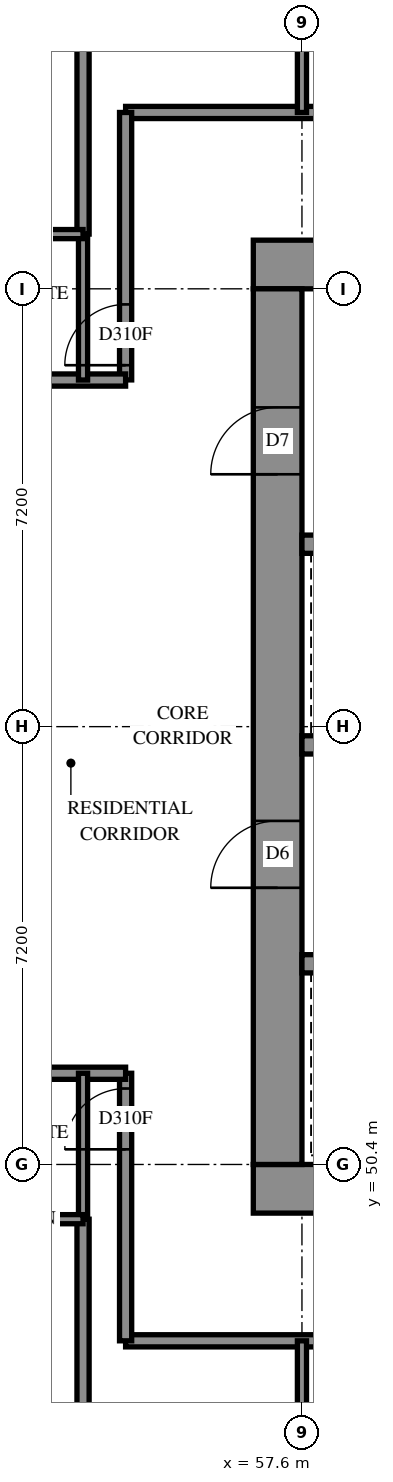
"""IFC4 building model, lengths in metres.
Left out: names, types, materials, properties, quantities, classifications, styles, units other than length and angle.
Written with IfcOpenShell. Run it as: python <this file> out.ifc"""

import sys

from ifc_helpers import new_model, si_unit, direction, frame, frame_2d, origin, place, context, subcontext, project, spatial, rectangle, extrude, element, fill, save


model = new_model("IFC4")
c1 = context("Model", 3, precision=1e-05, world=origin(), true_north=direction((0.0, 1.0)))
c2 = subcontext(c1, "Body", "Model", "MODEL_VIEW")
j1 = project(units=[si_unit("LENGTHUNIT", "METRE"), si_unit("PLANEANGLEUNIT", "RADIAN")], contexts=[c1])
p1 = place(None, origin())
s1 = spatial("IfcSite", under=j1, at=p1, CompositionType="ELEMENT")
p2 = place(p1, origin())
s2 = spatial("IfcBuilding", under=s1, at=p2, CompositionType="ELEMENT")
p3 = place(p2, frame((0.0, 0.0, 94.8)))
s3 = spatial("IfcBuildingStorey", under=s2, at=p3, CompositionType="ELEMENT", Elevation=94.8)
p4 = place(p3, frame((56.8, 50.0, -0.3), z_axis=(0.0, 0.0, 1.0), x_axis=(1.0, 0.0, 0.0)))
e1 = element("IfcWall", 1, at=p4, inside=s3, PredefinedType="SHEAR", context=c2, shape_type="SweptSolid", body=[
    extrude(rectangle(XDim=16.0, YDim=0.8, at=frame_2d((8.0, 0.0))), origin(), (0.0, 0.0, 1.0), 2.7),
])
p5 = place(p3, frame((56.8, 65.2, -0.3), z_axis=(0.0, 0.0, 1.0), x_axis=(1.0, 0.0, 0.0)))
e2 = element("IfcWall", 2, at=p5, inside=s3, PredefinedType="SHEAR", context=c2, shape_type="SweptSolid", body=[
    extrude(rectangle(XDim=16.0, YDim=0.8, at=frame_2d((8.0, 0.0))), origin(), (0.0, 0.0, 1.0), 2.7),
])
p6 = place(p5, frame((10.8, 0.0, 0.3)))
e3 = element("IfcOpeningElement", 3, at=p6, cuts=e2, PredefinedType="OPENING", context=c2, shape_type="SweptSolid", body=[
    extrude(rectangle(XDim=0.8, YDim=2.1, at=frame_2d((0.4, 1.05))), frame((0.0, 0.41, 0.0), z_axis=(0.0, -1.0, 0.0), x_axis=(1.0, 0.0, 0.0)), (0.0, 0.0, 1.0), 0.82),
])
p7 = place(p3, frame((57.2, 50.4, -0.3), z_axis=(0.0, 0.0, 1.0), x_axis=(0.0, 1.0, 0.0)))
e4 = element("IfcWall", 4, at=p7, inside=s3, PredefinedType="SHEAR", context=c2, shape_type="SweptSolid", body=[
    extrude(rectangle(XDim=14.4, YDim=0.8, at=frame_2d((7.2, 0.0))), origin(), (0.0, 0.0, 1.0), 2.7),
])
p8 = place(p7, frame((4.55, 0.0, 0.3)))
e5 = element("IfcOpeningElement", 5, at=p8, cuts=e4, PredefinedType="OPENING", context=c2, shape_type="SweptSolid", body=[
    extrude(rectangle(XDim=1.1, YDim=2.1, at=frame_2d((0.55, 1.05))), frame((0.0, 0.41, 0.0), z_axis=(0.0, -1.0, 0.0), x_axis=(1.0, 0.0, 0.0)), (0.0, 0.0, 1.0), 0.82),
])
p9 = place(p7, frame((11.35, 0.0, 0.3)))
e6 = element("IfcOpeningElement", 6, at=p9, cuts=e4, PredefinedType="OPENING", context=c2, shape_type="SweptSolid", body=[
    extrude(rectangle(XDim=1.1, YDim=2.1, at=frame_2d((0.55, 1.05))), frame((0.0, 0.41, 0.0), z_axis=(0.0, -1.0, 0.0), x_axis=(1.0, 0.0, 0.0)), (0.0, 0.0, 1.0), 0.82),
])
p10 = place(p3, frame((57.6, 53.7, 0.0), z_axis=(0.0, 0.0, 1.0), x_axis=(1.0, 0.0, 0.0)))
e7 = element("IfcWall", 7, at=p10, inside=s3, PredefinedType="SOLIDWALL", context=c2, shape_type="SweptSolid", body=[
    extrude(rectangle(XDim=14.4, YDim=0.3, at=frame_2d((7.2, 0.0))), origin(), (0.0, 0.0, 1.0), 3.1),
])
p11 = place(p10, frame((1.25, 0.0, 0.0)))
e8 = element("IfcOpeningElement", 8, at=p11, cuts=e7, PredefinedType="OPENING", context=c2, shape_type="SweptSolid", body=[
    extrude(rectangle(XDim=1.1, YDim=2.1, at=frame_2d((0.55, 1.05))), frame((0.0, 0.16, 0.0), z_axis=(0.0, -1.0, 0.0), x_axis=(1.0, 0.0, 0.0)), (0.0, 0.0, 1.0), 0.32),
])
p12 = place(p10, frame((4.85, 0.0, 0.0)))
e9 = element("IfcOpeningElement", 9, at=p12, cuts=e7, PredefinedType="OPENING", context=c2, shape_type="SweptSolid", body=[
    extrude(rectangle(XDim=1.1, YDim=2.1, at=frame_2d((0.55, 1.05))), frame((0.0, 0.16, 0.0), z_axis=(0.0, -1.0, 0.0), x_axis=(1.0, 0.0, 0.0)), (0.0, 0.0, 1.0), 0.32),
])
p13 = place(p10, frame((8.45, 0.0, 0.0)))
e10 = element("IfcOpeningElement", 10, at=p13, cuts=e7, PredefinedType="OPENING", context=c2, shape_type="SweptSolid", body=[
    extrude(rectangle(XDim=1.1, YDim=2.1, at=frame_2d((0.55, 1.05))), frame((0.0, 0.16, 0.0), z_axis=(0.0, -1.0, 0.0), x_axis=(1.0, 0.0, 0.0)), (0.0, 0.0, 1.0), 0.32),
])
p14 = place(p10, frame((12.05, 0.0, 0.0)))
e11 = element("IfcOpeningElement", 11, at=p14, cuts=e7, PredefinedType="OPENING", context=c2, shape_type="SweptSolid", body=[
    extrude(rectangle(XDim=1.1, YDim=2.1, at=frame_2d((0.55, 1.05))), frame((0.0, 0.16, 0.0), z_axis=(0.0, -1.0, 0.0), x_axis=(1.0, 0.0, 0.0)), (0.0, 0.0, 1.0), 0.32),
])
p15 = place(p3, frame((57.6, 57.3, 0.0), z_axis=(0.0, 0.0, 1.0), x_axis=(1.0, 0.0, 0.0)))
e12 = element("IfcWall", 12, at=p15, inside=s3, PredefinedType="SOLIDWALL", context=c2, shape_type="SweptSolid", body=[
    extrude(rectangle(XDim=14.4, YDim=0.3, at=frame_2d((7.2, 0.0))), origin(), (0.0, 0.0, 1.0), 3.1),
])
p16 = place(p15, frame((12.05, 0.0, 0.0)))
e13 = element("IfcOpeningElement", 13, at=p16, cuts=e12, PredefinedType="OPENING", context=c2, shape_type="SweptSolid", body=[
    extrude(rectangle(XDim=1.1, YDim=2.1, at=frame_2d((0.55, 1.05))), frame((0.0, 0.16, 0.0), z_axis=(0.0, -1.0, 0.0), x_axis=(1.0, 0.0, 0.0)), (0.0, 0.0, 1.0), 0.32),
])
p17 = place(p3, frame((57.6, 60.6, 0.0), z_axis=(0.0, 0.0, 1.0), x_axis=(1.0, 0.0, 0.0)))
e14 = element("IfcWall", 14, at=p17, inside=s3, PredefinedType="SOLIDWALL", context=c2, shape_type="SweptSolid", body=[
    extrude(rectangle(XDim=7.2, YDim=0.3, at=frame_2d((3.6, 0.0))), origin(), (0.0, 0.0, 1.0), 3.1),
])
p18 = place(p3, frame((54.7, 67.7, 0.0), z_axis=(0.0, 0.0, 1.0), x_axis=(1.0, 0.0, 0.0)))
e15 = element("IfcWall", 15, at=p18, inside=s3, PredefinedType="PARTITIONING", context=c2, shape_type="SweptSolid", body=[
    extrude(rectangle(XDim=20.2, YDim=0.2, at=frame_2d((10.1, 0.0))), origin(), (0.0, 0.0, 1.0), 3.1),
])
p19 = place(p18, frame((5.25, 0.0, 0.0)))
e16 = element("IfcOpeningElement", 16, at=p19, cuts=e15, PredefinedType="OPENING", context=c2, shape_type="SweptSolid", body=[
    extrude(rectangle(XDim=0.9, YDim=2.1, at=frame_2d((0.45, 1.05))), frame((0.0, 0.11, 0.0), z_axis=(0.0, -1.0, 0.0), x_axis=(1.0, 0.0, 0.0)), (0.0, 0.0, 1.0), 0.22),
])
p20 = place(p18, frame((6.9, 0.0, 0.0)))
e17 = element("IfcOpeningElement", 17, at=p20, cuts=e15, PredefinedType="OPENING", context=c2, shape_type="SweptSolid", body=[
    extrude(rectangle(XDim=0.9, YDim=2.1, at=frame_2d((0.45, 1.05))), frame((0.0, 0.11, 0.0), z_axis=(0.0, -1.0, 0.0), x_axis=(1.0, 0.0, 0.0)), (0.0, 0.0, 1.0), 0.22),
])
p21 = place(p18, frame((12.45, 0.0, 0.0)))
e18 = element("IfcOpeningElement", 18, at=p21, cuts=e15, PredefinedType="OPENING", context=c2, shape_type="SweptSolid", body=[
    extrude(rectangle(XDim=0.9, YDim=2.1, at=frame_2d((0.45, 1.05))), frame((0.0, 0.11, 0.0), z_axis=(0.0, -1.0, 0.0), x_axis=(1.0, 0.0, 0.0)), (0.0, 0.0, 1.0), 0.22),
])
p22 = place(p18, frame((14.1, 0.0, 0.0)))
e19 = element("IfcOpeningElement", 19, at=p22, cuts=e15, PredefinedType="OPENING", context=c2, shape_type="SweptSolid", body=[
    extrude(rectangle(XDim=0.9, YDim=2.1, at=frame_2d((0.45, 1.05))), frame((0.0, 0.11, 0.0), z_axis=(0.0, -1.0, 0.0), x_axis=(1.0, 0.0, 0.0)), (0.0, 0.0, 1.0), 0.22),
])
p23 = place(p3, frame((54.7, 47.5, 0.0), z_axis=(0.0, 0.0, 1.0), x_axis=(1.0, 0.0, 0.0)))
e20 = element("IfcWall", 20, at=p23, inside=s3, PredefinedType="PARTITIONING", context=c2, shape_type="SweptSolid", body=[
    extrude(rectangle(XDim=19.442, YDim=0.2, at=frame_2d((9.721, 0.0))), origin(), (0.0, 0.0, 1.0), 3.1),
])
p24 = place(p23, frame((5.2, 0.0, 0.0)))
e21 = element("IfcOpeningElement", 21, at=p24, cuts=e20, PredefinedType="OPENING", context=c2, shape_type="SweptSolid", body=[
    extrude(rectangle(XDim=0.9, YDim=2.1, at=frame_2d((0.45, 1.05))), frame((0.0, 0.11, 0.0), z_axis=(0.0, -1.0, 0.0), x_axis=(1.0, 0.0, 0.0)), (0.0, 0.0, 1.0), 0.22),
])
p25 = place(p23, frame((6.9, 0.0, 0.0)))
e22 = element("IfcOpeningElement", 22, at=p25, cuts=e20, PredefinedType="OPENING", context=c2, shape_type="SweptSolid", body=[
    extrude(rectangle(XDim=0.9, YDim=2.1, at=frame_2d((0.45, 1.05))), frame((0.0, 0.11, 0.0), z_axis=(0.0, -1.0, 0.0), x_axis=(1.0, 0.0, 0.0)), (0.0, 0.0, 1.0), 0.22),
])
p26 = place(p23, frame((13.963, 0.0, 0.0)))
e23 = element("IfcOpeningElement", 23, at=p26, cuts=e20, PredefinedType="OPENING", context=c2, shape_type="SweptSolid", body=[
    extrude(rectangle(XDim=1.0, YDim=2.1, at=frame_2d((0.5, 1.05))), frame((0.0, 0.11, 0.0), z_axis=(0.0, -1.0, 0.0), x_axis=(1.0, 0.0, 0.0)), (0.0, 0.0, 1.0), 0.22),
])
p27 = place(p3, frame((54.0, 42.384, 0.0), z_axis=(0.0, 0.0, 1.0), x_axis=(0.0, 1.0, 0.0)))
e24 = element("IfcWall", 24, at=p27, inside=s3, PredefinedType="PARTITIONING", context=c2, shape_type="SweptSolid", body=[
    extrude(rectangle(XDim=7.116, YDim=0.2, at=frame_2d((3.558, 0.0))), origin(), (0.0, 0.0, 1.0), 3.1),
])
p28 = place(p3, frame((54.0, 65.7, 0.0), z_axis=(0.0, 0.0, 1.0), x_axis=(0.0, 1.0, 0.0)))
e25 = element("IfcWall", 25, at=p28, inside=s3, PredefinedType="PARTITIONING", context=c2, shape_type="SweptSolid", body=[
    extrude(rectangle(XDim=6.997, YDim=0.2, at=frame_2d((3.498, 0.0))), origin(), (0.0, 0.0, 1.0), 3.1),
])
p29 = place(p3, frame((54.7, 47.5, 0.0), z_axis=(0.0, 0.0, 1.0), x_axis=(0.0, 1.0, 0.0)))
e26 = element("IfcWall", 26, at=p29, inside=s3, PredefinedType="PARTITIONING", context=c2, shape_type="SweptSolid", body=[
    extrude(rectangle(XDim=4.4, YDim=0.2, at=frame_2d((2.2, 0.0))), origin(), (0.0, 0.0, 1.0), 3.1),
])
p30 = place(p29, frame((3.149, 0.0, 0.0)))
e27 = element("IfcOpeningElement", 27, at=p30, cuts=e26, PredefinedType="OPENING", context=c2, shape_type="SweptSolid", body=[
    extrude(rectangle(XDim=1.0, YDim=2.1, at=frame_2d((0.5, 1.05))), frame((0.0, 0.11, 0.0), z_axis=(0.0, -1.0, 0.0), x_axis=(1.0, 0.0, 0.0)), (0.0, 0.0, 1.0), 0.22),
])
p31 = place(p3, frame((54.7, 63.302, 0.0), z_axis=(0.0, 0.0, 1.0), x_axis=(0.0, 1.0, 0.0)))
e28 = element("IfcWall", 28, at=p31, inside=s3, PredefinedType="PARTITIONING", context=c2, shape_type="SweptSolid", body=[
    extrude(rectangle(XDim=4.398, YDim=0.2, at=frame_2d((2.199, 0.0))), origin(), (0.0, 0.0, 1.0), 3.1),
])
p32 = place(p31, frame((0.242, 0.0, 0.0)))
e29 = element("IfcOpeningElement", 29, at=p32, cuts=e28, PredefinedType="OPENING", context=c2, shape_type="SweptSolid", body=[
    extrude(rectangle(XDim=1.0, YDim=2.1, at=frame_2d((0.5, 1.05))), frame((0.0, 0.11, 0.0), z_axis=(0.0, -1.0, 0.0), x_axis=(1.0, 0.0, 0.0)), (0.0, 0.0, 1.0), 0.22),
])
p33 = place(p3, frame((50.4, 51.9, 0.0), z_axis=(0.0, 0.0, 1.0), x_axis=(1.0, 0.0, 0.0)))
e30 = element("IfcWall", 30, at=p33, inside=s3, PredefinedType="PARTITIONING", context=c2, shape_type="SweptSolid", body=[
    extrude(rectangle(XDim=4.3, YDim=0.2, at=frame_2d((2.15, 0.0))), origin(), (0.0, 0.0, 1.0), 3.1),
])
p34 = place(p33, frame((0.552, 0.0, 0.0)))
e31 = element("IfcOpeningElement", 31, at=p34, cuts=e30, PredefinedType="OPENING", context=c2, shape_type="SweptSolid", body=[
    extrude(rectangle(XDim=0.9, YDim=2.1, at=frame_2d((0.45, 1.05))), frame((0.0, 0.11, 0.0), z_axis=(0.0, -1.0, 0.0), x_axis=(1.0, 0.0, 0.0)), (0.0, 0.0, 1.0), 0.22),
])
p35 = place(p3, frame((50.4, 63.3, 0.0), z_axis=(0.0, 0.0, 1.0), x_axis=(1.0, 0.0, 0.0)))
e32 = element("IfcWall", 32, at=p35, inside=s3, PredefinedType="PARTITIONING", context=c2, shape_type="SweptSolid", body=[
    extrude(rectangle(XDim=4.3, YDim=0.2, at=frame_2d((2.15, 0.0))), origin(), (0.0, 0.0, 1.0), 3.1),
])
p36 = place(p35, frame((0.552, 0.0, 0.0)))
e33 = element("IfcOpeningElement", 33, at=p36, cuts=e32, PredefinedType="OPENING", context=c2, shape_type="SweptSolid", body=[
    extrude(rectangle(XDim=0.9, YDim=2.1, at=frame_2d((0.45, 1.05))), frame((0.0, 0.11, 0.0), z_axis=(0.0, -1.0, 0.0), x_axis=(1.0, 0.0, 0.0)), (0.0, 0.0, 1.0), 0.22),
])
for number, where, z_axis, x_axis in (
    (34, (54.0, 63.3, 0.0), (0.0, 0.0, 1.0), (0.0, 1.0, 0.0)),
    (35, (54.0, 49.5, 0.0), (0.0, 0.0, 1.0), (0.0, 1.0, 0.0)),
    (36, (57.6, 45.1, 0.0), (0.0, 0.0, 1.0), (0.0, 1.0, 0.0)),
    (37, (57.6, 67.7, 0.0), (0.0, 0.0, 1.0), (0.0, 1.0, 0.0)),
):
    element("IfcWall", number, at=place(p3, frame(where, z_axis=z_axis, x_axis=x_axis)), inside=s3, PredefinedType="PARTITIONING", context=c2, shape_type="SweptSolid", body=[
        extrude(rectangle(XDim=2.4, YDim=0.15, at=frame_2d((1.2, 0.0))), origin(), (0.0, 0.0, 1.0), 3.1),
    ])
p37 = place(p3, frame((52.1, 49.5, 0.0), z_axis=(0.0, 0.0, 1.0), x_axis=(1.0, 0.0, 0.0)))
e38 = element("IfcWall", 38, at=p37, inside=s3, PredefinedType="PARTITIONING", context=c2, shape_type="SweptSolid", body=[
    extrude(rectangle(XDim=1.9, YDim=0.15, at=frame_2d((0.95, 0.0))), origin(), (0.0, 0.0, 1.0), 3.1),
])
p38 = place(p37, frame((0.598, 0.0, 0.0)))
e39 = element("IfcOpeningElement", 39, at=p38, cuts=e38, PredefinedType="OPENING", context=c2, shape_type="SweptSolid", body=[
    extrude(rectangle(XDim=0.8, YDim=2.1, at=frame_2d((0.4, 1.05))), frame((0.0, 0.085, 0.0), z_axis=(0.0, -1.0, 0.0), x_axis=(1.0, 0.0, 0.0)), (0.0, 0.0, 1.0), 0.17),
])
p39 = place(p3, frame((52.1, 65.7, 0.0), z_axis=(0.0, 0.0, 1.0), x_axis=(1.0, 0.0, 0.0)))
e40 = element("IfcWall", 40, at=p39, inside=s3, PredefinedType="PARTITIONING", context=c2, shape_type="SweptSolid", body=[
    extrude(rectangle(XDim=1.9, YDim=0.15, at=frame_2d((0.95, 0.0))), origin(), (0.0, 0.0, 1.0), 3.1),
])
p40 = place(p39, frame((0.493, 0.0, 0.0)))
e41 = element("IfcOpeningElement", 41, at=p40, cuts=e40, PredefinedType="OPENING", context=c2, shape_type="SweptSolid", body=[
    extrude(rectangle(XDim=0.8, YDim=2.1, at=frame_2d((0.4, 1.05))), frame((0.0, 0.085, 0.0), z_axis=(0.0, -1.0, 0.0), x_axis=(1.0, 0.0, 0.0)), (0.0, 0.0, 1.0), 0.17),
])
p41 = place(p8, origin())
e42 = element("IfcDoor", 42, at=p41, inside=s3, OperationType="DOUBLE_DOOR_SINGLE_SWING", PredefinedType="DOOR", context=c2, shape_type="SweptSolid", body=[
    extrude(rectangle(XDim=1.1, YDim=2.1, at=frame_2d((0.55, 1.05))), frame((0.0, 0.025, 0.0), z_axis=(0.0, -1.0, 0.0), x_axis=(1.0, 0.0, 0.0)), (0.0, 0.0, 1.0), 0.05),
])
fill(e5, e42)
p42 = place(p9, origin())
e43 = element("IfcDoor", 43, at=p42, inside=s3, OperationType="SINGLE_SWING_LEFT", PredefinedType="DOOR", context=c2, shape_type="SweptSolid", body=[
    extrude(rectangle(XDim=1.1, YDim=2.1, at=frame_2d((0.55, 1.05))), frame((0.0, 0.025, 0.0), z_axis=(0.0, -1.0, 0.0), x_axis=(1.0, 0.0, 0.0)), (0.0, 0.0, 1.0), 0.05),
])
fill(e6, e43)
p43 = place(p32, origin())
e44 = element("IfcDoor", 44, at=p43, inside=s3, OperationType="SINGLE_SWING_LEFT", PredefinedType="DOOR", context=c2, shape_type="SweptSolid", body=[
    extrude(rectangle(XDim=1.0, YDim=2.1, at=frame_2d((0.5, 1.05))), frame((0.0, 0.025, 0.0), z_axis=(0.0, -1.0, 0.0), x_axis=(1.0, 0.0, 0.0)), (0.0, 0.0, 1.0), 0.05),
])
fill(e29, e44)
p44 = place(p30, origin())
e45 = element("IfcDoor", 45, at=p44, inside=s3, OperationType="SINGLE_SWING_RIGHT", PredefinedType="DOOR", context=c2, shape_type="SweptSolid", body=[
    extrude(rectangle(XDim=1.0, YDim=2.1, at=frame_2d((0.5, 1.05))), frame((0.0, 0.025, 0.0), z_axis=(0.0, -1.0, 0.0), x_axis=(1.0, 0.0, 0.0)), (0.0, 0.0, 1.0), 0.05),
])
fill(e27, e45)
save(model, sys.argv[1])
